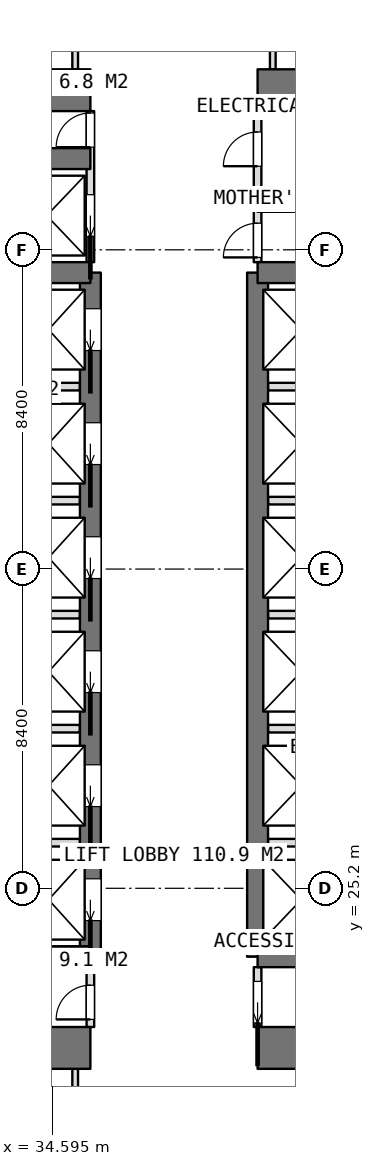
"""IFC4 building model, lengths in metres.
Left out: names, types, materials, properties, quantities, classifications, styles, units other than length and angle.
Written with IfcOpenShell. Run it as: python <this file> out.ifc"""

import sys

from ifc_helpers import new_model, si_unit, direction, frame, frame_2d, origin, place, context, subcontext, project, spatial, rectangle, extrude, element, fill, save


model = new_model("IFC4")
c1 = context("Model", 3, precision=1e-05, world=origin(), true_north=direction((0.0, 1.0)))
c2 = subcontext(c1, "Body", "Model", "MODEL_VIEW")
j1 = project(units=[si_unit("LENGTHUNIT", "METRE"), si_unit("PLANEANGLEUNIT", "RADIAN")], contexts=[c1])
p1 = place(None, origin())
s1 = spatial("IfcSite", under=j1, at=p1, CompositionType="ELEMENT")
p2 = place(p1, origin())
s2 = spatial("IfcBuilding", under=s1, at=p2, CompositionType="ELEMENT")
p3 = place(p2, frame((0.0, 0.0, 62.9)))
s3 = spatial("IfcBuildingStorey", under=s2, at=p3, CompositionType="ELEMENT", Elevation=62.9)
p4 = place(p3, frame((25.2, 21.0, 0.0), z_axis=(0.0, 0.0, 1.0), x_axis=(1.0, 0.0, 0.0)))
e1 = element("IfcWall", 1, at=p4, inside=s3, PredefinedType="SHEAR", context=c2, shape_type="SweptSolid", body=[
    extrude(rectangle(XDim=10.4, YDim=1.1, at=frame_2d((5.2, 0.0))), origin(), (0.0, 0.0, 1.0), 3.75),
])
p5 = place(p3, frame((40.0, 21.0, 0.0), z_axis=(0.0, 0.0, 1.0), x_axis=(1.0, 0.0, 0.0)))
e2 = element("IfcWall", 2, at=p5, inside=s3, PredefinedType="SHEAR", context=c2, shape_type="SweptSolid", body=[
    extrude(rectangle(XDim=10.4, YDim=1.1, at=frame_2d((5.2, 0.0))), origin(), (0.0, 0.0, 1.0), 3.75),
])
p6 = place(p3, frame((25.2, 46.2, 0.0), z_axis=(0.0, 0.0, 1.0), x_axis=(1.0, 0.0, 0.0)))
e3 = element("IfcWall", 3, at=p6, inside=s3, PredefinedType="SHEAR", context=c2, shape_type="SweptSolid", body=[
    extrude(rectangle(XDim=10.4, YDim=1.1, at=frame_2d((5.2, 0.0))), origin(), (0.0, 0.0, 1.0), 3.75),
])
p7 = place(p3, frame((40.0, 46.2, 0.0), z_axis=(0.0, 0.0, 1.0), x_axis=(1.0, 0.0, 0.0)))
e4 = element("IfcWall", 4, at=p7, inside=s3, PredefinedType="SHEAR", context=c2, shape_type="SweptSolid", body=[
    extrude(rectangle(XDim=10.4, YDim=1.1, at=frame_2d((5.2, 0.0))), origin(), (0.0, 0.0, 1.0), 3.75),
])
p8 = place(p3, frame((35.6, 23.4, 0.0), z_axis=(0.0, 0.0, 1.0), x_axis=(0.0, 1.0, 0.0)))
e5 = element("IfcWall", 5, at=p8, inside=s3, PredefinedType="SHEAR", context=c2, shape_type="SweptSolid", body=[
    extrude(rectangle(XDim=18.0, YDim=0.55, at=frame_2d((9.0, 0.0))), origin(), (0.0, 0.0, 1.0), 3.75),
])
p9 = place(p8, frame((0.95, 0.0, 0.0)))
e6 = element("IfcOpeningElement", 6, at=p9, cuts=e5, PredefinedType="OPENING", context=c2, shape_type="SweptSolid", body=[
    extrude(rectangle(XDim=1.1, YDim=2.1, at=frame_2d((0.55, 1.05))), frame((0.0, 0.285, 0.0), z_axis=(0.0, -1.0, 0.0), x_axis=(1.0, 0.0, 0.0)), (0.0, 0.0, 1.0), 0.57),
])
p10 = place(p8, frame((3.95, 0.0, 0.0)))
e7 = element("IfcOpeningElement", 7, at=p10, cuts=e5, PredefinedType="OPENING", context=c2, shape_type="SweptSolid", body=[
    extrude(rectangle(XDim=1.1, YDim=2.1, at=frame_2d((0.55, 1.05))), frame((0.0, 0.285, 0.0), z_axis=(0.0, -1.0, 0.0), x_axis=(1.0, 0.0, 0.0)), (0.0, 0.0, 1.0), 0.57),
])
p11 = place(p8, frame((6.95, 0.0, 0.0)))
e8 = element("IfcOpeningElement", 8, at=p11, cuts=e5, PredefinedType="OPENING", context=c2, shape_type="SweptSolid", body=[
    extrude(rectangle(XDim=1.1, YDim=2.1, at=frame_2d((0.55, 1.05))), frame((0.0, 0.285, 0.0), z_axis=(0.0, -1.0, 0.0), x_axis=(1.0, 0.0, 0.0)), (0.0, 0.0, 1.0), 0.57),
])
p12 = place(p8, frame((9.95, 0.0, 0.0)))
e9 = element("IfcOpeningElement", 9, at=p12, cuts=e5, PredefinedType="OPENING", context=c2, shape_type="SweptSolid", body=[
    extrude(rectangle(XDim=1.1, YDim=2.1, at=frame_2d((0.55, 1.05))), frame((0.0, 0.285, 0.0), z_axis=(0.0, -1.0, 0.0), x_axis=(1.0, 0.0, 0.0)), (0.0, 0.0, 1.0), 0.57),
])
p13 = place(p8, frame((12.95, 0.0, 0.0)))
e10 = element("IfcOpeningElement", 10, at=p13, cuts=e5, PredefinedType="OPENING", context=c2, shape_type="SweptSolid", body=[
    extrude(rectangle(XDim=1.1, YDim=2.1, at=frame_2d((0.55, 1.05))), frame((0.0, 0.285, 0.0), z_axis=(0.0, -1.0, 0.0), x_axis=(1.0, 0.0, 0.0)), (0.0, 0.0, 1.0), 0.57),
])
p14 = place(p8, frame((15.95, 0.0, 0.0)))
e11 = element("IfcOpeningElement", 11, at=p14, cuts=e5, PredefinedType="OPENING", context=c2, shape_type="SweptSolid", body=[
    extrude(rectangle(XDim=1.1, YDim=2.1, at=frame_2d((0.55, 1.05))), frame((0.0, 0.285, 0.0), z_axis=(0.0, -1.0, 0.0), x_axis=(1.0, 0.0, 0.0)), (0.0, 0.0, 1.0), 0.57),
])
p15 = place(p3, frame((40.0, 23.4, 0.0), z_axis=(0.0, 0.0, 1.0), x_axis=(0.0, 1.0, 0.0)))
e12 = element("IfcWall", 12, at=p15, inside=s3, PredefinedType="SHEAR", context=c2, shape_type="SweptSolid", body=[
    extrude(rectangle(XDim=18.0, YDim=0.55, at=frame_2d((9.0, 0.0))), origin(), (0.0, 0.0, 1.0), 3.75),
])
for number, where, z_axis, x_axis in (
    (13, (31.8, 23.4, 0.0), (0.0, 0.0, 1.0), (1.0, 0.0, 0.0)),
    (14, (31.8, 41.4, 0.0), (0.0, 0.0, 1.0), (1.0, 0.0, 0.0)),
    (15, (31.8, 44.4, 0.0), (0.0, 0.0, 1.0), (1.0, 0.0, 0.0)),
    (16, (40.0, 23.4, 0.0), (0.0, 0.0, 1.0), (1.0, 0.0, 0.0)),
    (17, (40.0, 41.4, 0.0), (0.0, 0.0, 1.0), (1.0, 0.0, 0.0)),
):
    element("IfcWall", number, at=place(p3, frame(where, z_axis=z_axis, x_axis=x_axis)), inside=s3, PredefinedType="SHEAR", context=c2, shape_type="SweptSolid", body=[
        extrude(rectangle(XDim=3.8, YDim=0.55, at=frame_2d((1.9, 0.0))), origin(), (0.0, 0.0, 1.0), 3.75),
    ])
for number, where, z_axis, x_axis in (
    (18, (32.075, 26.4, 0.0), (0.0, 0.0, 1.0), (1.0, 0.0, 0.0)),
    (19, (32.075, 29.4, 0.0), (0.0, 0.0, 1.0), (1.0, 0.0, 0.0)),
    (20, (32.075, 32.4, 0.0), (0.0, 0.0, 1.0), (1.0, 0.0, 0.0)),
    (21, (32.075, 35.4, 0.0), (0.0, 0.0, 1.0), (1.0, 0.0, 0.0)),
    (22, (32.075, 38.4, 0.0), (0.0, 0.0, 1.0), (1.0, 0.0, 0.0)),
    (23, (40.275, 26.4, 0.0), (0.0, 0.0, 1.0), (1.0, 0.0, 0.0)),
    (24, (40.275, 29.4, 0.0), (0.0, 0.0, 1.0), (1.0, 0.0, 0.0)),
    (25, (40.275, 32.4, 0.0), (0.0, 0.0, 1.0), (1.0, 0.0, 0.0)),
    (26, (40.275, 35.4, 0.0), (0.0, 0.0, 1.0), (1.0, 0.0, 0.0)),
    (27, (40.275, 38.4, 0.0), (0.0, 0.0, 1.0), (1.0, 0.0, 0.0)),
):
    element("IfcWall", number, at=place(p3, frame(where, z_axis=z_axis, x_axis=x_axis)), inside=s3, PredefinedType="PARTITIONING", context=c2, shape_type="SweptSolid", body=[
        extrude(rectangle(XDim=3.25, YDim=0.2, at=frame_2d((1.625, 0.0))), origin(), (0.0, 0.0, 1.0), 3.5),
    ])
p16 = place(p3, frame((40.0, 21.55, 0.0), z_axis=(0.0, 0.0, 1.0), x_axis=(0.0, 1.0, 0.0)))
e28 = element("IfcWall", 28, at=p16, inside=s3, PredefinedType="PARTITIONING", context=c2, shape_type="SweptSolid", body=[
    extrude(rectangle(XDim=1.575, YDim=0.2, at=frame_2d((0.788, 0.0))), origin(), (0.0, 0.0, 1.0), 3.5),
])
p17 = place(p16, frame((0.1, 0.0, 0.0)))
e29 = element("IfcOpeningElement", 29, at=p17, cuts=e28, PredefinedType="OPENING", context=c2, shape_type="SweptSolid", body=[
    extrude(rectangle(XDim=1.1, YDim=2.1, at=frame_2d((0.55, 1.05))), frame((0.0, 0.11, 0.0), z_axis=(0.0, -1.0, 0.0), x_axis=(1.0, 0.0, 0.0)), (0.0, 0.0, 1.0), 0.22),
])
p18 = place(p3, frame((40.0, 41.675, 0.0), z_axis=(0.0, 0.0, 1.0), x_axis=(0.0, 1.0, 0.0)))
e30 = element("IfcWall", 30, at=p18, inside=s3, PredefinedType="PARTITIONING", context=c2, shape_type="SweptSolid", body=[
    extrude(rectangle(XDim=3.975, YDim=0.2, at=frame_2d((1.987, 0.0))), origin(), (0.0, 0.0, 1.0), 3.5),
])
p19 = place(p18, frame((2.525, 0.0, 0.0)))
e31 = element("IfcOpeningElement", 31, at=p19, cuts=e30, PredefinedType="OPENING", context=c2, shape_type="SweptSolid", body=[
    extrude(rectangle(XDim=0.9, YDim=2.1, at=frame_2d((0.45, 1.05))), frame((0.0, 0.11, 0.0), z_axis=(0.0, -1.0, 0.0), x_axis=(1.0, 0.0, 0.0)), (0.0, 0.0, 1.0), 0.22),
])
p20 = place(p18, frame((0.125, 0.0, 0.0)))
e32 = element("IfcOpeningElement", 32, at=p20, cuts=e30, PredefinedType="OPENING", context=c2, shape_type="SweptSolid", body=[
    extrude(rectangle(XDim=0.9, YDim=2.1, at=frame_2d((0.45, 1.05))), frame((0.0, 0.11, 0.0), z_axis=(0.0, -1.0, 0.0), x_axis=(1.0, 0.0, 0.0)), (0.0, 0.0, 1.0), 0.22),
])
p21 = place(p3, frame((35.6, 41.675, 0.0), z_axis=(0.0, 0.0, 1.0), x_axis=(0.0, 1.0, 0.0)))
e33 = element("IfcWall", 33, at=p21, inside=s3, PredefinedType="PARTITIONING", context=c2, shape_type="SweptSolid", body=[
    extrude(rectangle(XDim=3.975, YDim=0.2, at=frame_2d((1.987, 0.0))), origin(), (0.0, 0.0, 1.0), 3.5),
])
p22 = place(p21, frame((3.025, 0.0, 0.0)))
e34 = element("IfcOpeningElement", 34, at=p22, cuts=e33, PredefinedType="OPENING", context=c2, shape_type="SweptSolid", body=[
    extrude(rectangle(XDim=0.9, YDim=2.1, at=frame_2d((0.45, 1.05))), frame((0.0, 0.11, 0.0), z_axis=(0.0, -1.0, 0.0), x_axis=(1.0, 0.0, 0.0)), (0.0, 0.0, 1.0), 0.22),
])
p23 = place(p21, frame((0.675, 0.0, 0.0)))
e35 = element("IfcOpeningElement", 35, at=p23, cuts=e33, PredefinedType="OPENING", context=c2, shape_type="SweptSolid", body=[
    extrude(rectangle(XDim=1.1, YDim=2.1, at=frame_2d((0.55, 1.05))), frame((0.0, 0.11, 0.0), z_axis=(0.0, -1.0, 0.0), x_axis=(1.0, 0.0, 0.0)), (0.0, 0.0, 1.0), 0.22),
])
p24 = place(p3, frame((35.6, 21.55, 0.0), z_axis=(0.0, 0.0, 1.0), x_axis=(0.0, 1.0, 0.0)))
e36 = element("IfcWall", 36, at=p24, inside=s3, PredefinedType="PARTITIONING", context=c2, shape_type="SweptSolid", body=[
    extrude(rectangle(XDim=1.575, YDim=0.2, at=frame_2d((0.788, 0.0))), origin(), (0.0, 0.0, 1.0), 3.5),
])
p25 = place(p24, frame((0.2, 0.0, 0.0)))
e37 = element("IfcOpeningElement", 37, at=p25, cuts=e36, PredefinedType="OPENING", context=c2, shape_type="SweptSolid", body=[
    extrude(rectangle(XDim=0.9, YDim=2.1, at=frame_2d((0.45, 1.05))), frame((0.0, 0.11, 0.0), z_axis=(0.0, -1.0, 0.0), x_axis=(1.0, 0.0, 0.0)), (0.0, 0.0, 1.0), 0.22),
])
p26 = place(p3, frame((40.0, 43.1, 0.0), z_axis=(0.0, 0.0, 1.0), x_axis=(1.0, 0.0, 0.0)))
e38 = element("IfcWall", 38, at=p26, inside=s3, PredefinedType="PARTITIONING", context=c2, shape_type="SweptSolid", body=[
    extrude(rectangle(XDim=3.525, YDim=0.2, at=frame_2d((1.762, 0.0))), origin(), (0.0, 0.0, 1.0), 3.5),
])
for number, where, z_axis, x_axis in (
    (39, (40.4, 46.75, 0.0), (0.0, 0.0, 1.0), (0.0, 1.0, 0.0)),
    (40, (35.2, 46.75, 0.0), (0.0, 0.0, 1.0), (0.0, 1.0, 0.0)),
    (41, (35.2, 17.875, 0.0), (0.0, 0.0, 1.0), (0.0, 1.0, 0.0)),
):
    element("IfcWall", number, at=place(p3, frame(where, z_axis=z_axis, x_axis=x_axis)), inside=s3, PredefinedType="PARTITIONING", context=c2, shape_type="SweptSolid", body=[
        extrude(rectangle(XDim=2.575, YDim=0.15, at=frame_2d((1.288, 0.0))), origin(), (0.0, 0.0, 1.0), 3.5),
    ])
p27 = place(p17, origin())
e42 = element("IfcDoor", 42, at=p27, inside=s3, OperationType="SLIDING_TO_LEFT", PredefinedType="DOOR", context=c2, shape_type="SweptSolid", body=[
    extrude(rectangle(XDim=1.1, YDim=2.1, at=frame_2d((0.55, 1.05))), frame((0.0, 0.025, 0.0), z_axis=(0.0, -1.0, 0.0), x_axis=(1.0, 0.0, 0.0)), (0.0, 0.0, 1.0), 0.05),
])
fill(e29, e42)
p28 = place(p25, origin())
e43 = element("IfcDoor", 43, at=p28, inside=s3, OperationType="SINGLE_SWING_LEFT", PredefinedType="DOOR", context=c2, shape_type="SweptSolid", body=[
    extrude(rectangle(XDim=0.9, YDim=2.1, at=frame_2d((0.45, 1.05))), frame((0.0, 0.025, 0.0), z_axis=(0.0, -1.0, 0.0), x_axis=(1.0, 0.0, 0.0)), (0.0, 0.0, 1.0), 0.05),
])
fill(e37, e43)
p29 = place(p19, origin())
e44 = element("IfcDoor", 44, at=p29, inside=s3, OperationType="SINGLE_SWING_LEFT", PredefinedType="DOOR", context=c2, shape_type="SweptSolid", body=[
    extrude(rectangle(XDim=0.9, YDim=2.1, at=frame_2d((0.45, 1.05))), frame((0.0, 0.025, 0.0), z_axis=(0.0, -1.0, 0.0), x_axis=(1.0, 0.0, 0.0)), (0.0, 0.0, 1.0), 0.05),
])
fill(e31, e44)
p30 = place(p20, origin())
e45 = element("IfcDoor", 45, at=p30, inside=s3, OperationType="SINGLE_SWING_LEFT", PredefinedType="DOOR", context=c2, shape_type="SweptSolid", body=[
    extrude(rectangle(XDim=0.9, YDim=2.1, at=frame_2d((0.45, 1.05))), frame((0.0, 0.025, 0.0), z_axis=(0.0, -1.0, 0.0), x_axis=(1.0, 0.0, 0.0)), (0.0, 0.0, 1.0), 0.05),
])
fill(e32, e45)
p31 = place(p22, origin())
e46 = element("IfcDoor", 46, at=p31, inside=s3, OperationType="SINGLE_SWING_LEFT", PredefinedType="DOOR", context=c2, shape_type="SweptSolid", body=[
    extrude(rectangle(XDim=0.9, YDim=2.1, at=frame_2d((0.45, 1.05))), frame((0.0, 0.025, 0.0), z_axis=(0.0, -1.0, 0.0), x_axis=(1.0, 0.0, 0.0)), (0.0, 0.0, 1.0), 0.05),
])
fill(e34, e46)
p32 = place(p9, origin())
e47 = element("IfcDoor", 47, at=p32, inside=s3, OperationType="SLIDING_TO_LEFT", PredefinedType="USERDEFINED", context=c2, shape_type="SweptSolid", body=[
    extrude(rectangle(XDim=1.1, YDim=2.1, at=frame_2d((0.55, 1.05))), frame((0.0, 0.025, 0.0), z_axis=(0.0, -1.0, 0.0), x_axis=(1.0, 0.0, 0.0)), (0.0, 0.0, 1.0), 0.05),
])
fill(e6, e47)
p33 = place(p10, origin())
e48 = element("IfcDoor", 48, at=p33, inside=s3, OperationType="SLIDING_TO_LEFT", PredefinedType="USERDEFINED", context=c2, shape_type="SweptSolid", body=[
    extrude(rectangle(XDim=1.1, YDim=2.1, at=frame_2d((0.55, 1.05))), frame((0.0, 0.025, 0.0), z_axis=(0.0, -1.0, 0.0), x_axis=(1.0, 0.0, 0.0)), (0.0, 0.0, 1.0), 0.05),
])
fill(e7, e48)
p34 = place(p11, origin())
e49 = element("IfcDoor", 49, at=p34, inside=s3, OperationType="SLIDING_TO_LEFT", PredefinedType="USERDEFINED", context=c2, shape_type="SweptSolid", body=[
    extrude(rectangle(XDim=1.1, YDim=2.1, at=frame_2d((0.55, 1.05))), frame((0.0, 0.025, 0.0), z_axis=(0.0, -1.0, 0.0), x_axis=(1.0, 0.0, 0.0)), (0.0, 0.0, 1.0), 0.05),
])
fill(e8, e49)
p35 = place(p12, origin())
e50 = element("IfcDoor", 50, at=p35, inside=s3, OperationType="SLIDING_TO_LEFT", PredefinedType="USERDEFINED", context=c2, shape_type="SweptSolid", body=[
    extrude(rectangle(XDim=1.1, YDim=2.1, at=frame_2d((0.55, 1.05))), frame((0.0, 0.025, 0.0), z_axis=(0.0, -1.0, 0.0), x_axis=(1.0, 0.0, 0.0)), (0.0, 0.0, 1.0), 0.05),
])
fill(e9, e50)
p36 = place(p13, origin())
e51 = element("IfcDoor", 51, at=p36, inside=s3, OperationType="SLIDING_TO_LEFT", PredefinedType="USERDEFINED", context=c2, shape_type="SweptSolid", body=[
    extrude(rectangle(XDim=1.1, YDim=2.1, at=frame_2d((0.55, 1.05))), frame((0.0, 0.025, 0.0), z_axis=(0.0, -1.0, 0.0), x_axis=(1.0, 0.0, 0.0)), (0.0, 0.0, 1.0), 0.05),
])
fill(e10, e51)
p37 = place(p14, origin())
e52 = element("IfcDoor", 52, at=p37, inside=s3, OperationType="SLIDING_TO_LEFT", PredefinedType="USERDEFINED", context=c2, shape_type="SweptSolid", body=[
    extrude(rectangle(XDim=1.1, YDim=2.1, at=frame_2d((0.55, 1.05))), frame((0.0, 0.025, 0.0), z_axis=(0.0, -1.0, 0.0), x_axis=(1.0, 0.0, 0.0)), (0.0, 0.0, 1.0), 0.05),
])
fill(e11, e52)
p38 = place(p23, origin())
e53 = element("IfcDoor", 53, at=p38, inside=s3, OperationType="SLIDING_TO_LEFT", PredefinedType="USERDEFINED", context=c2, shape_type="SweptSolid", body=[
    extrude(rectangle(XDim=1.1, YDim=2.1, at=frame_2d((0.55, 1.05))), frame((0.0, 0.025, 0.0), z_axis=(0.0, -1.0, 0.0), x_axis=(1.0, 0.0, 0.0)), (0.0, 0.0, 1.0), 0.05),
])
fill(e35, e53)
save(model, sys.argv[1])
